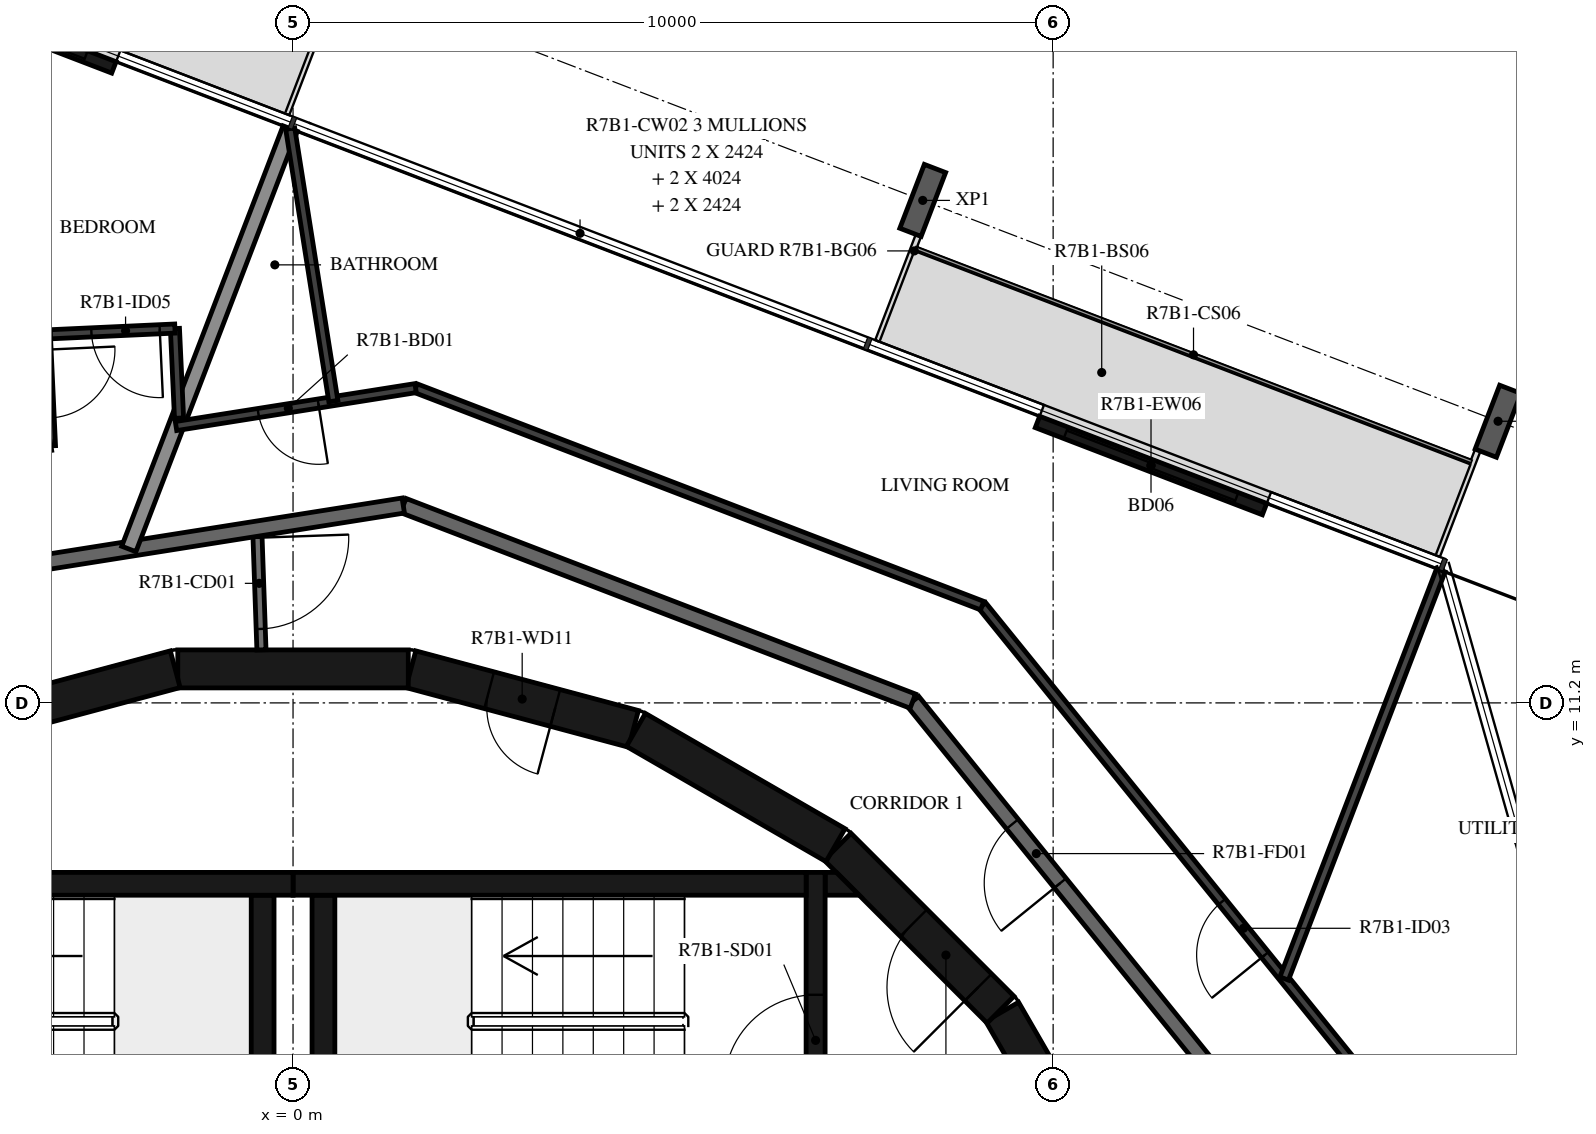
"""IFC4 building model, lengths in metres.
Left out: names, types, materials, properties, quantities, classifications, styles, units other than length and angle.
Written with IfcOpenShell. Run it as: python <this file> out.ifc"""

import sys

from ifc_helpers import new_model, si_unit, direction, frame, frame_2d, origin, origin_2d, place, context, subcontext, project, spatial, polyline, rectangle, i_section, outline, extrude, element, fill, save


model = new_model("IFC4")
c1 = context("Model", 3, precision=1e-05, world=origin(), true_north=direction((0.0, 1.0)))
c2 = subcontext(c1, "Body", "Model", "MODEL_VIEW")
j1 = project(units=[si_unit("LENGTHUNIT", "METRE"), si_unit("PLANEANGLEUNIT", "RADIAN")], contexts=[c1])
p1 = place(None, origin())
s1 = spatial("IfcSite", under=j1, at=p1, CompositionType="ELEMENT")
p2 = place(p1, origin())
s2 = spatial("IfcBuilding", under=s1, at=p2, CompositionType="ELEMENT")
p3 = place(p2, frame((0.0, 0.0, 273.9)))
s3 = spatial("IfcBuildingStorey", under=s2, at=p3, CompositionType="ELEMENT", Elevation=273.9)
for number, where, z_axis, x_axis in (
    (1, (15.854, 14.905, -0.38), (0.0, 0.0, 1.0), (0.934, -0.358, 0.0)),
    (2, (8.284, 17.811, -0.38), (0.0, 0.0, 1.0), (0.934, -0.358, 0.0)),
):
    element("IfcColumn", number, at=place(p3, frame(where, z_axis=z_axis, x_axis=x_axis)), inside=s3, PredefinedType="COLUMN", context=c2, shape_type="SweptSolid", body=[
        extrude(i_section(OverallWidth=0.3, OverallDepth=0.9, WebThickness=0.019, FlangeThickness=0.035, FilletRadius=0.03, at=origin_2d()), origin(), (0.0, 0.0, 1.0), 3.5),
    ])
p4 = place(p3, frame((12.781, 13.75, 0.0), z_axis=(0.0, 0.0, 1.0), x_axis=(-0.933579413923, 0.358370587381, 0.0)))
e3 = element("IfcWall", 3, at=p4, inside=s3, PredefinedType="STANDARD", context=c2, shape_type="SweptSolid", body=[
    extrude(rectangle(XDim=3.2, YDim=0.16, at=frame_2d((1.6, 0.0))), origin(), (0.0, 0.0, 1.0), 3.12),
])
p5 = place(p4, frame((0.4, 0.0, 0.0)))
e4 = element("IfcOpeningElement", 4, at=p5, cuts=e3, PredefinedType="OPENING", context=c2, shape_type="SweptSolid", body=[
    extrude(rectangle(XDim=2.4, YDim=2.4, at=frame_2d((1.2, 1.2))), frame((0.0, 0.09, 0.0), z_axis=(0.0, -1.0, 0.0), x_axis=(1.0, 0.0, 0.0)), (0.0, 0.0, 1.0), 0.18),
])
p6 = place(p3, frame((-2.357, 19.56, 0.0), z_axis=(0.0, 0.0, 1.0), x_axis=(-0.933553885508, 0.358437083534, 0.0)))
e5 = element("IfcWall", 5, at=p6, inside=s3, PredefinedType="STANDARD", context=c2, shape_type="SweptSolid", body=[
    extrude(rectangle(XDim=3.2, YDim=0.16, at=frame_2d((1.6, 0.0))), origin(), (0.0, 0.0, 1.0), 3.12),
])
p7 = place(p6, frame((0.4, 0.0, 0.0)))
e6 = element("IfcOpeningElement", 6, at=p7, cuts=e5, PredefinedType="OPENING", context=c2, shape_type="SweptSolid", body=[
    extrude(rectangle(XDim=2.4, YDim=2.4, at=frame_2d((1.2, 1.2))), frame((0.0, 0.09, 0.0), z_axis=(0.0, -1.0, 0.0), x_axis=(1.0, 0.0, 0.0)), (0.0, 0.0, 1.0), 0.18),
])
p8 = place(p3, frame((10.845, 4.51, 0.0), z_axis=(0.0, 0.0, 1.0), x_axis=(-0.500087131594, 0.865975092491, 0.0)))
e7 = element("IfcWall", 7, at=p8, inside=s3, PredefinedType="SHEAR", context=c2, shape_type="SweptSolid", body=[
    extrude(rectangle(XDim=3.033, YDim=0.5, at=frame_2d((1.516, 0.0))), origin(), (0.0, 0.0, 1.0), 3.12),
])
p9 = place(p3, frame((9.308, 7.164, 0.0), z_axis=(0.0, 0.0, 1.0), x_axis=(-0.707106781187, 0.707106781187, 0.0)))
e8 = element("IfcWall", 8, at=p9, inside=s3, PredefinedType="SHEAR", context=c2, shape_type="SweptSolid", body=[
    extrude(rectangle(XDim=3.032, YDim=0.5, at=frame_2d((1.516, 0.0))), origin(), (0.0, 0.0, 1.0), 3.12),
])
p10 = place(p9, frame((0.416, 0.0, 0.0)))
e9 = element("IfcOpeningElement", 9, at=p10, cuts=e8, PredefinedType="OPENING", context=c2, shape_type="SweptSolid", body=[
    extrude(rectangle(XDim=1.2, YDim=2.1, at=frame_2d((0.6, 1.05))), frame((0.0, 0.26, 0.0), z_axis=(0.0, -1.0, 0.0), x_axis=(1.0, 0.0, 0.0)), (0.0, 0.0, 1.0), 0.52),
])
p11 = place(p3, frame((7.137, 9.329, 0.0), z_axis=(0.0, 0.0, 1.0), x_axis=(-0.865975092491, 0.500087131594, 0.0)))
e10 = element("IfcWall", 10, at=p11, inside=s3, PredefinedType="SHEAR", context=c2, shape_type="SweptSolid", body=[
    extrude(rectangle(XDim=3.033, YDim=0.5, at=frame_2d((1.516, 0.0))), origin(), (0.0, 0.0, 1.0), 3.12),
])
p12 = place(p3, frame((4.479, 10.858, 0.0), z_axis=(0.0, 0.0, 1.0), x_axis=(-0.965948410781, 0.258734743916, 0.0)))
e11 = element("IfcWall", 11, at=p12, inside=s3, PredefinedType="SHEAR", context=c2, shape_type="SweptSolid", body=[
    extrude(rectangle(XDim=3.033, YDim=0.5, at=frame_2d((1.516, 0.0))), origin(), (0.0, 0.0, 1.0), 3.12),
])
p13 = place(p12, frame((1.066, 0.0, 0.0)))
e12 = element("IfcOpeningElement", 12, at=p13, cuts=e11, PredefinedType="OPENING", context=c2, shape_type="SweptSolid", body=[
    extrude(rectangle(XDim=0.9, YDim=2.1, at=frame_2d((0.45, 1.05))), frame((0.0, 0.26, 0.0), z_axis=(0.0, -1.0, 0.0), x_axis=(1.0, 0.0, 0.0)), (0.0, 0.0, 1.0), 0.52),
])
for number, where, z_axis, x_axis in (
    (13, (1.516, 11.647, 0.0), (0.0, 0.0, 1.0), (-1.0, 0.0, 0.0)),
    (14, (-1.55, 11.643, 0.0), (0.0, 0.0, 1.0), (-0.966, -0.259, 0.0)),
):
    element("IfcWall", number, at=place(p3, frame(where, z_axis=z_axis, x_axis=x_axis)), inside=s3, PredefinedType="SHEAR", context=c2, shape_type="SweptSolid", body=[
        extrude(rectangle(XDim=3.033, YDim=0.5, at=frame_2d((1.516, 0.0))), origin(), (0.0, 0.0, 1.0), 3.12),
    ])
p14 = place(p3, frame((0.0, 8.82, 0.0), z_axis=(0.0, 0.0, 1.0), x_axis=(1.0, 0.0, 0.0)))
e15 = element("IfcWall", 15, at=p14, inside=s3, PredefinedType="SHEAR", context=c2, shape_type="SweptSolid", body=[
    extrude(rectangle(XDim=6.75, YDim=0.3, at=frame_2d((3.375, 0.0))), origin(), (0.0, 0.0, 1.0), 3.12),
])
p15 = place(p3, frame((0.4, 5.35, 0.0), z_axis=(0.0, 0.0, 1.0), x_axis=(0.0, 1.0, 0.0)))
e16 = element("IfcWall", 16, at=p15, inside=s3, PredefinedType="SHEAR", context=c2, shape_type="SweptSolid", body=[
    extrude(rectangle(XDim=3.32, YDim=0.3, at=frame_2d((1.66, 0.0))), origin(), (0.0, 0.0, 1.0), 3.12),
])
p16 = place(p3, frame((6.875, 5.05, 0.0), z_axis=(0.0, 0.0, 1.0), x_axis=(0.0, 1.0, 0.0)))
e17 = element("IfcWall", 17, at=p16, inside=s3, PredefinedType="SHEAR", context=c2, shape_type="SweptSolid", body=[
    extrude(rectangle(XDim=3.92, YDim=0.25, at=frame_2d((1.96, 0.0))), origin(), (0.0, 0.0, 1.0), 3.12),
])
p17 = place(p16, frame((1.11, 0.0, 0.0)))
e18 = element("IfcOpeningElement", 18, at=p17, cuts=e17, PredefinedType="OPENING", context=c2, shape_type="SweptSolid", body=[
    extrude(rectangle(XDim=1.2, YDim=2.1, at=frame_2d((0.6, 1.05))), frame((0.0, 0.135, 0.0), z_axis=(0.0, -1.0, 0.0), x_axis=(1.0, 0.0, 0.0)), (0.0, 0.0, 1.0), 0.27),
])
p18 = place(p3, origin())
e19 = element("IfcWall", 19, at=p18, inside=s3, PredefinedType="SHEAR", context=c2, shape_type="SweptSolid", body=[
    extrude(outline(polyline([(7.448, 8.67), (7.0, 8.67), (7.0, 8.97), (7.148, 8.97), (7.448, 8.67)])), origin(), (0.0, 0.0, 1.0), 3.12),
])
p19 = place(p3, frame((-6.75, 8.82, 0.0), z_axis=(0.0, 0.0, 1.0), x_axis=(1.0, 0.0, 0.0)))
e20 = element("IfcWall", 20, at=p19, inside=s3, PredefinedType="SHEAR", context=c2, shape_type="SweptSolid", body=[
    extrude(rectangle(XDim=6.75, YDim=0.3, at=frame_2d((3.375, 0.0))), origin(), (0.0, 0.0, 1.0), 3.12),
])
p20 = place(p3, frame((-0.4, 5.35, 0.0), z_axis=(0.0, 0.0, 1.0), x_axis=(0.0, 1.0, 0.0)))
e21 = element("IfcWall", 21, at=p20, inside=s3, PredefinedType="SHEAR", context=c2, shape_type="SweptSolid", body=[
    extrude(rectangle(XDim=3.32, YDim=0.3, at=frame_2d((1.66, 0.0))), origin(), (0.0, 0.0, 1.0), 3.12),
])
p21 = place(p3, frame((-0.471, 13.492, 0.0), z_axis=(0.0, 0.0, 1.0), x_axis=(0.034873173869, -0.999391745886, 0.0)))
e22 = element("IfcWall", 22, at=p21, inside=s3, PredefinedType="PARTITIONING", context=c2, shape_type="SweptSolid", body=[
    extrude(rectangle(XDim=1.596, YDim=0.12, at=frame_2d((0.798, 0.0))), origin(), (0.0, 0.0, 1.0), 3.12),
])
p22 = place(p21, frame((0.12, 0.0, 0.0)))
e23 = element("IfcOpeningElement", 23, at=p22, cuts=e22, PredefinedType="OPENING", context=c2, shape_type="SweptSolid", body=[
    extrude(rectangle(XDim=1.2, YDim=2.1, at=frame_2d((0.6, 1.05))), frame((0.0, 0.07, 0.0), z_axis=(0.0, -1.0, 0.0), x_axis=(1.0, 0.0, 0.0)), (0.0, 0.0, 1.0), 0.14),
])
p23 = place(p3, frame((12.673, 5.643, 0.0), z_axis=(0.0, 0.0, 1.0), x_axis=(-0.629302871585, 0.777160148113, 0.0)))
e24 = element("IfcWall", 24, at=p23, inside=s3, PredefinedType="STANDARD", context=c2, shape_type="SweptSolid", body=[
    extrude(rectangle(XDim=7.181, YDim=0.2, at=frame_2d((3.59, 0.0))), origin(), (0.0, 0.0, 1.0), 3.12),
])
p24 = place(p23, frame((4.1, 0.0, 0.0)))
e25 = element("IfcOpeningElement", 25, at=p24, cuts=e24, PredefinedType="OPENING", context=c2, shape_type="SweptSolid", body=[
    extrude(rectangle(XDim=1.0, YDim=2.1, at=frame_2d((0.5, 1.05))), frame((0.0, 0.11, 0.0), z_axis=(0.0, -1.0, 0.0), x_axis=(1.0, 0.0, 0.0)), (0.0, 0.0, 1.0), 0.22),
])
p25 = place(p3, frame((8.154, 11.223, 0.0), z_axis=(0.0, 0.0, 1.0), x_axis=(-0.93359073609, 0.358341090983, 0.0)))
e26 = element("IfcWall", 26, at=p25, inside=s3, PredefinedType="STANDARD", context=c2, shape_type="SweptSolid", body=[
    extrude(rectangle(XDim=7.181, YDim=0.2, at=frame_2d((3.59, 0.0))), origin(), (0.0, 0.0, 1.0), 3.12),
])
p26 = place(p3, frame((1.45, 13.797, 0.0), z_axis=(0.0, 0.0, 1.0), x_axis=(-0.987690361611, -0.156421704315, 0.0)))
e27 = element("IfcWall", 27, at=p26, inside=s3, PredefinedType="STANDARD", context=c2, shape_type="SweptSolid", body=[
    extrude(rectangle(XDim=7.181, YDim=0.2, at=frame_2d((3.591, 0.0))), origin(), (0.0, 0.0, 1.0), 3.12),
])
p27 = place(p3, frame((-0.037, 18.756, 0.0), z_axis=(0.0, 0.0, 1.0), x_axis=(-0.358365943542, -0.933581196527, 0.0)))
e28 = element("IfcWall", 28, at=p27, inside=s3, PredefinedType="STANDARD", context=c2, shape_type="SweptSolid", body=[
    extrude(rectangle(XDim=5.924, YDim=0.2, at=frame_2d((2.962, 0.0))), origin(), (0.0, 0.0, 1.0), 2.73),
])
p28 = place(p3, frame((14.092, 6.274, 0.0), z_axis=(0.0, 0.0, 1.0), x_axis=(-0.62933367237, 0.777135206268, 0.0)))
e29 = element("IfcWall", 29, at=p28, inside=s3, PredefinedType="PARTITIONING", context=c2, shape_type="SweptSolid", body=[
    extrude(rectangle(XDim=7.985, YDim=0.12, at=frame_2d((3.992, 0.0))), origin(), (0.0, 0.0, 1.0), 3.12),
])
p29 = place(p28, frame((2.073, 0.0, 0.0)))
e30 = element("IfcOpeningElement", 30, at=p29, cuts=e29, PredefinedType="OPENING", context=c2, shape_type="SweptSolid", body=[
    extrude(rectangle(XDim=0.9, YDim=2.1, at=frame_2d((0.45, 1.05))), frame((0.0, 0.07, 0.0), z_axis=(0.0, -1.0, 0.0), x_axis=(1.0, 0.0, 0.0)), (0.0, 0.0, 1.0), 0.14),
])
p30 = place(p3, frame((9.067, 12.479, 0.0), z_axis=(0.0, 0.0, 1.0), x_axis=(-0.933579449035, 0.358370495911, 0.0)))
e31 = element("IfcWall", 31, at=p30, inside=s3, PredefinedType="PARTITIONING", context=c2, shape_type="SweptSolid", body=[
    extrude(rectangle(XDim=7.985, YDim=0.12, at=frame_2d((3.992, 0.0))), origin(), (0.0, 0.0, 1.0), 3.12),
])
p31 = place(p3, frame((1.612, 15.341, 0.0), z_axis=(0.0, 0.0, 1.0), x_axis=(-0.987687176419, -0.156441815179, 0.0)))
e32 = element("IfcWall", 32, at=p31, inside=s3, PredefinedType="PARTITIONING", context=c2, shape_type="SweptSolid", body=[
    extrude(rectangle(XDim=3.191, YDim=0.12, at=frame_2d((1.596, 0.0))), origin(), (0.0, 0.0, 1.0), 3.12),
])
p32 = place(p31, frame((1.295, 0.0, 0.0)))
e33 = element("IfcOpeningElement", 33, at=p32, cuts=e32, PredefinedType="OPENING", context=c2, shape_type="SweptSolid", body=[
    extrude(rectangle(XDim=0.8, YDim=2.1, at=frame_2d((0.4, 1.05))), frame((0.0, 0.07, 0.0), z_axis=(0.0, -1.0, 0.0), x_axis=(1.0, 0.0, 0.0)), (0.0, 0.0, 1.0), 0.14),
])
p33 = place(p3, frame((15.101, 12.945, 0.0), z_axis=(0.0, 0.0, 1.0), x_axis=(-0.358373232579, -0.933578398513, 0.0)))
e34 = element("IfcWall", 34, at=p33, inside=s3, PredefinedType="PARTITIONING", context=c2, shape_type="SweptSolid", body=[
    extrude(rectangle(XDim=5.752, YDim=0.12, at=frame_2d((2.876, 0.0))), origin(), (0.0, 0.0, 1.0), 2.73),
])
p34 = place(p3, frame((-0.037, 18.756, 0.0), z_axis=(0.0, 0.0, 1.0), x_axis=(0.156421851095, -0.987690338365, 0.0)))
e35 = element("IfcWall", 35, at=p34, inside=s3, PredefinedType="PARTITIONING", context=c2, shape_type="SweptSolid", body=[
    extrude(rectangle(XDim=3.63, YDim=0.12, at=frame_2d((1.815, 0.0))), origin(), (0.0, 0.0, 1.0), 3.12),
])
p35 = place(p3, frame((-1.5, 14.946, 0.0), z_axis=(0.0, 0.0, 1.0), x_axis=(-0.045923747874, 0.998944948123, 0.0)))
e36 = element("IfcWall", 36, at=p35, inside=s3, PredefinedType="PARTITIONING", context=c2, shape_type="SweptSolid", body=[
    extrude(rectangle(XDim=1.18, YDim=0.12, at=frame_2d((0.59, 0.0))), origin(), (0.0, 0.0, 1.0), 3.12),
])
p36 = place(p3, frame((-1.554, 16.125, 0.0), z_axis=(0.0, 0.0, 1.0), x_axis=(-0.998943517875, -0.045954848436, 0.0)))
e37 = element("IfcWall", 37, at=p36, inside=s3, PredefinedType="PARTITIONING", context=c2, shape_type="SweptSolid", body=[
    extrude(rectangle(XDim=1.7, YDim=0.12, at=frame_2d((0.85, 0.0))), origin(), (0.0, 0.0, 1.0), 3.12),
])
p37 = place(p36, frame((0.2, 0.0, 0.0)))
e38 = element("IfcOpeningElement", 38, at=p37, cuts=e37, PredefinedType="OPENING", context=c2, shape_type="SweptSolid", body=[
    extrude(rectangle(XDim=0.9, YDim=2.1, at=frame_2d((0.45, 1.05))), frame((0.0, 0.07, 0.0), z_axis=(0.0, -1.0, 0.0), x_axis=(1.0, 0.0, 0.0)), (0.0, 0.0, 1.0), 0.14),
])
p38 = place(p3, frame((-3.252, 16.047, 0.0), z_axis=(0.0, 0.0, 1.0), x_axis=(0.045928493331, -0.998944729953, 0.0)))
e39 = element("IfcWall", 39, at=p38, inside=s3, PredefinedType="PARTITIONING", context=c2, shape_type="SweptSolid", body=[
    extrude(rectangle(XDim=1.467, YDim=0.12, at=frame_2d((0.733, 0.0))), origin(), (0.0, 0.0, 1.0), 3.12),
])
p39 = place(p38, frame((0.2, 0.0, 0.0)))
e40 = element("IfcOpeningElement", 40, at=p39, cuts=e39, PredefinedType="OPENING", context=c2, shape_type="SweptSolid", body=[
    extrude(rectangle(XDim=0.9, YDim=2.1, at=frame_2d((0.45, 1.05))), frame((0.0, 0.07, 0.0), z_axis=(0.0, -1.0, 0.0), x_axis=(1.0, 0.0, 0.0)), (0.0, 0.0, 1.0), 0.14),
])
p40 = place(p5, origin())
e41 = element("IfcDoor", 41, at=p40, inside=s3, OperationType="DOUBLE_DOOR_SLIDING", PredefinedType="DOOR", context=c2, shape_type="SweptSolid", body=[
    extrude(rectangle(XDim=2.4, YDim=2.4, at=frame_2d((1.2, 1.2))), frame((0.0, 0.025, 0.0), z_axis=(0.0, -1.0, 0.0), x_axis=(1.0, 0.0, 0.0)), (0.0, 0.0, 1.0), 0.05),
])
fill(e4, e41)
p41 = place(p7, origin())
e42 = element("IfcDoor", 42, at=p41, inside=s3, OperationType="DOUBLE_DOOR_SLIDING", PredefinedType="DOOR", context=c2, shape_type="SweptSolid", body=[
    extrude(rectangle(XDim=2.4, YDim=2.4, at=frame_2d((1.2, 1.2))), frame((0.0, 0.025, 0.0), z_axis=(0.0, -1.0, 0.0), x_axis=(1.0, 0.0, 0.0)), (0.0, 0.0, 1.0), 0.05),
])
fill(e6, e42)
p42 = place(p17, origin())
e43 = element("IfcDoor", 43, at=p42, inside=s3, OperationType="SINGLE_SWING_LEFT", PredefinedType="DOOR", context=c2, shape_type="SweptSolid", body=[
    extrude(rectangle(XDim=1.2, YDim=2.1, at=frame_2d((0.6, 1.05))), frame((0.0, 0.025, 0.0), z_axis=(0.0, -1.0, 0.0), x_axis=(1.0, 0.0, 0.0)), (0.0, 0.0, 1.0), 0.05),
])
fill(e18, e43)
p43 = place(p10, origin())
e44 = element("IfcDoor", 44, at=p43, inside=s3, OperationType="SINGLE_SWING_RIGHT", PredefinedType="DOOR", context=c2, shape_type="SweptSolid", body=[
    extrude(rectangle(XDim=1.2, YDim=2.1, at=frame_2d((0.6, 1.05))), frame((0.0, 0.025, 0.0), z_axis=(0.0, -1.0, 0.0), x_axis=(1.0, 0.0, 0.0)), (0.0, 0.0, 1.0), 0.05),
])
fill(e9, e44)
p44 = place(p13, origin())
e45 = element("IfcDoor", 45, at=p44, inside=s3, OperationType="SINGLE_SWING_LEFT", PredefinedType="DOOR", context=c2, shape_type="SweptSolid", body=[
    extrude(rectangle(XDim=0.9, YDim=2.1, at=frame_2d((0.45, 1.05))), frame((0.0, 0.025, 0.0), z_axis=(0.0, -1.0, 0.0), x_axis=(1.0, 0.0, 0.0)), (0.0, 0.0, 1.0), 0.05),
])
fill(e12, e45)
p45 = place(p24, origin())
e46 = element("IfcDoor", 46, at=p45, inside=s3, OperationType="SINGLE_SWING_LEFT", PredefinedType="DOOR", context=c2, shape_type="SweptSolid", body=[
    extrude(rectangle(XDim=1.0, YDim=2.1, at=frame_2d((0.5, 1.05))), frame((0.0, 0.025, 0.0), z_axis=(0.0, -1.0, 0.0), x_axis=(1.0, 0.0, 0.0)), (0.0, 0.0, 1.0), 0.05),
])
fill(e25, e46)
p46 = place(p29, origin())
e47 = element("IfcDoor", 47, at=p46, inside=s3, OperationType="SINGLE_SWING_LEFT", PredefinedType="DOOR", context=c2, shape_type="SweptSolid", body=[
    extrude(rectangle(XDim=0.9, YDim=2.1, at=frame_2d((0.45, 1.05))), frame((0.0, 0.025, 0.0), z_axis=(0.0, -1.0, 0.0), x_axis=(1.0, 0.0, 0.0)), (0.0, 0.0, 1.0), 0.05),
])
fill(e30, e47)
p47 = place(p32, origin())
e48 = element("IfcDoor", 48, at=p47, inside=s3, OperationType="SINGLE_SWING_RIGHT", PredefinedType="DOOR", context=c2, shape_type="SweptSolid", body=[
    extrude(rectangle(XDim=0.8, YDim=2.1, at=frame_2d((0.4, 1.05))), frame((0.0, 0.025, 0.0), z_axis=(0.0, -1.0, 0.0), x_axis=(1.0, 0.0, 0.0)), (0.0, 0.0, 1.0), 0.05),
])
fill(e33, e48)
p48 = place(p37, origin())
e49 = element("IfcDoor", 49, at=p48, inside=s3, OperationType="SINGLE_SWING_RIGHT", PredefinedType="DOOR", context=c2, shape_type="SweptSolid", body=[
    extrude(rectangle(XDim=0.9, YDim=2.1, at=frame_2d((0.45, 1.05))), frame((0.0, 0.025, 0.0), z_axis=(0.0, -1.0, 0.0), x_axis=(1.0, 0.0, 0.0)), (0.0, 0.0, 1.0), 0.05),
])
fill(e38, e49)
p49 = place(p22, origin())
e50 = element("IfcDoor", 50, at=p49, inside=s3, OperationType="DOUBLE_DOOR_SINGLE_SWING", PredefinedType="DOOR", context=c2, shape_type="SweptSolid", body=[
    extrude(rectangle(XDim=1.2, YDim=2.1, at=frame_2d((0.6, 1.05))), frame((0.0, 0.025, 0.0), z_axis=(0.0, -1.0, 0.0), x_axis=(1.0, 0.0, 0.0)), (0.0, 0.0, 1.0), 0.05),
])
fill(e23, e50)
save(model, sys.argv[1])
